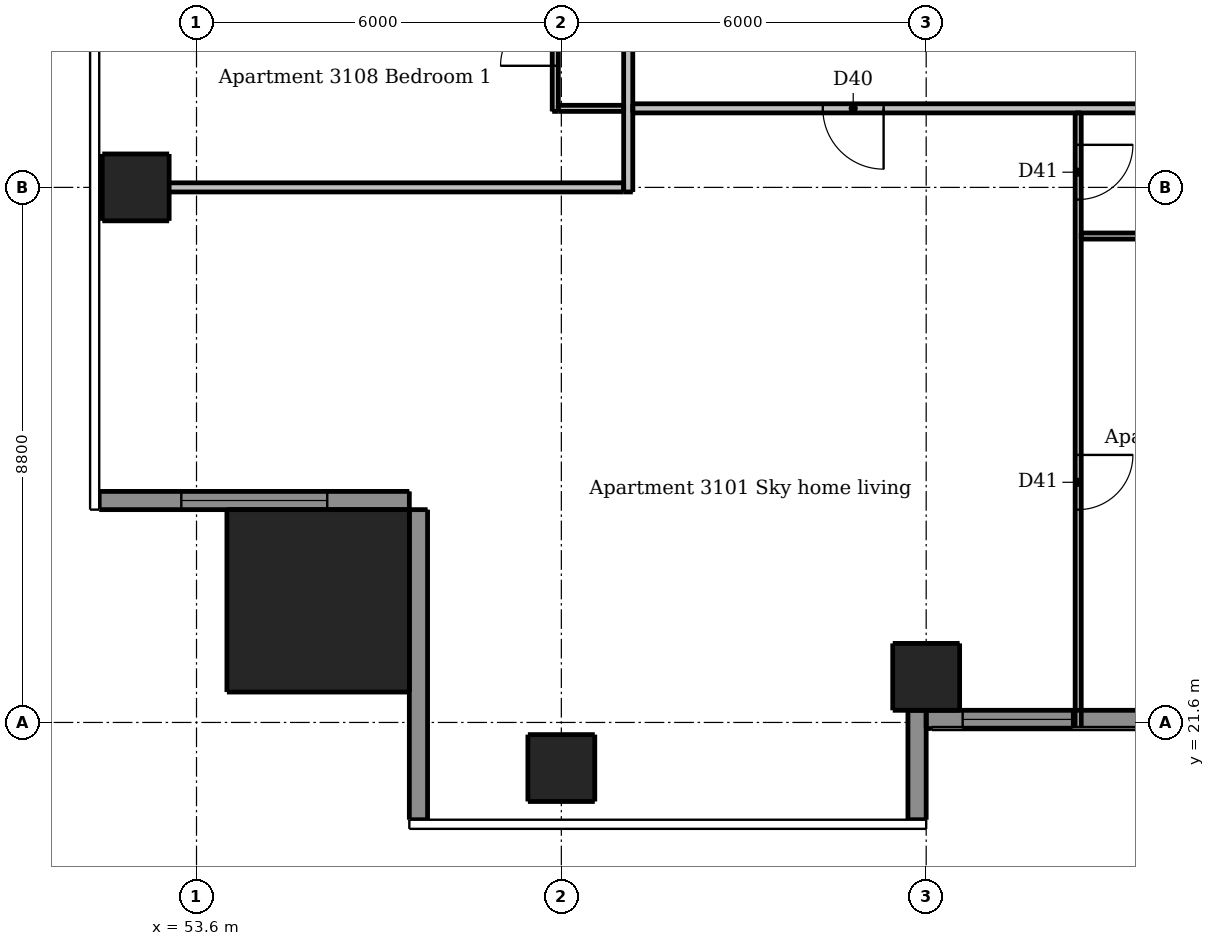
"""IFC4 building model, lengths in metres.
Left out: names, types, materials, properties, quantities, classifications, styles, units other than length and angle.
Written with IfcOpenShell. Run it as: python <this file> out.ifc"""

import sys

from ifc_helpers import new_model, si_unit, direction, frame, frame_2d, origin, origin_2d, place, context, subcontext, project, spatial, rectangle, extrude, element, fill, save


model = new_model("IFC4")
c1 = context("Model", 3, precision=1e-05, world=origin(), true_north=direction((0.0, 1.0)))
c2 = subcontext(c1, "Body", "Model", "MODEL_VIEW")
j1 = project(units=[si_unit("LENGTHUNIT", "METRE"), si_unit("PLANEANGLEUNIT", "RADIAN")], contexts=[c1])
p1 = place(None, origin())
s1 = spatial("IfcSite", under=j1, at=p1, CompositionType="ELEMENT")
p2 = place(p1, origin())
s2 = spatial("IfcBuilding", under=s1, at=p2, CompositionType="ELEMENT")
p3 = place(p2, frame((0.0, 0.0, 115.0)))
s3 = spatial("IfcBuildingStorey", under=s2, at=p3, CompositionType="ELEMENT", Elevation=115.0)
for number, where, z_axis, x_axis in (
    (1, (59.6, 20.85, 0.0), (0.0, 0.0, 1.0), (1.0, 0.0, 0.0)),
    (2, (65.6, 22.35, 0.0), (0.0, 0.0, 1.0), (1.0, 0.0, 0.0)),
    (3, (52.6, 30.4, 0.0), (0.0, 0.0, 1.0), (1.0, 0.0, 0.0)),
):
    element("IfcColumn", number, at=place(p3, frame(where, z_axis=z_axis, x_axis=x_axis)), inside=s3, PredefinedType="COLUMN", context=c2, shape_type="SweptSolid", body=[
        extrude(rectangle(XDim=1.1, YDim=1.1, at=origin_2d()), origin(), (0.0, 0.0, 1.0), 3.05),
    ])
p4 = place(p3, frame((55.6, 23.6, 0.0), z_axis=(0.0, 0.0, 1.0), x_axis=(1.0, 0.0, 0.0)))
e4 = element("IfcColumn", 4, at=p4, inside=s3, PredefinedType="COLUMN", context=c2, shape_type="SweptSolid", body=[
    extrude(rectangle(XDim=3.0, YDim=3.0, at=origin_2d()), origin(), (0.0, 0.0, 1.0), 3.3),
])
p5 = place(p3, frame((65.45, 20.0, 0.0), z_axis=(0.0, 0.0, 1.0), x_axis=(0.0, 1.0, 0.0)))
e5 = element("IfcWall", 5, at=p5, inside=s3, PredefinedType="SOLIDWALL", context=c2, shape_type="SweptSolid", body=[
    extrude(rectangle(XDim=1.8, YDim=0.3, at=frame_2d((0.9, 0.0))), origin(), (0.0, 0.0, 1.0), 3.05),
])
p6 = place(p3, frame((52.0, 25.25, 0.0), z_axis=(0.0, 0.0, 1.0), x_axis=(1.0, 0.0, 0.0)))
e6 = element("IfcWall", 6, at=p6, inside=s3, PredefinedType="SOLIDWALL", context=c2, shape_type="SweptSolid", body=[
    extrude(rectangle(XDim=5.1, YDim=0.3, at=frame_2d((2.55, 0.0))), origin(), (0.0, 0.0, 1.0), 3.05),
])
p7 = place(p6, frame((1.35, 0.0, 0.15)))
e7 = element("IfcOpeningElement", 7, at=p7, cuts=e6, PredefinedType="OPENING", context=c2, shape_type="SweptSolid", body=[
    extrude(rectangle(XDim=2.4, YDim=2.1, at=frame_2d((1.2, 1.05))), frame((0.0, 0.16, 0.0), z_axis=(0.0, -1.0, 0.0), x_axis=(1.0, 0.0, 0.0)), (0.0, 0.0, 1.0), 0.32),
])
p8 = place(p3, frame((57.25, 25.1, 0.0), z_axis=(0.0, 0.0, 1.0), x_axis=(0.0, -1.0, 0.0)))
e8 = element("IfcWall", 8, at=p8, inside=s3, PredefinedType="SOLIDWALL", context=c2, shape_type="SweptSolid", body=[
    extrude(rectangle(XDim=5.1, YDim=0.3, at=frame_2d((2.55, 0.0))), origin(), (0.0, 0.0, 1.0), 3.05),
])
p9 = place(p3, frame((65.6, 21.65, 0.0), z_axis=(0.0, 0.0, 1.0), x_axis=(1.0, 0.0, 0.0)))
e9 = element("IfcWall", 9, at=p9, inside=s3, PredefinedType="SOLIDWALL", context=c2, shape_type="SweptSolid", body=[
    extrude(rectangle(XDim=5.7, YDim=0.3, at=frame_2d((2.85, 0.0))), origin(), (0.0, 0.0, 1.0), 3.05),
])
p10 = place(p9, frame((0.6, 0.0, 0.15)))
e10 = element("IfcOpeningElement", 10, at=p10, cuts=e9, PredefinedType="OPENING", context=c2, shape_type="SweptSolid", body=[
    extrude(rectangle(XDim=1.8, YDim=2.1, at=frame_2d((0.9, 1.05))), frame((0.0, 0.16, 0.0), z_axis=(0.0, -1.0, 0.0), x_axis=(1.0, 0.0, 0.0)), (0.0, 0.0, 1.0), 0.32),
])
p11 = place(p9, frame((3.6, 0.0, 0.15)))
e11 = element("IfcOpeningElement", 11, at=p11, cuts=e9, PredefinedType="OPENING", context=c2, shape_type="SweptSolid", body=[
    extrude(rectangle(XDim=1.8, YDim=2.1, at=frame_2d((0.9, 1.05))), frame((0.0, 0.16, 0.0), z_axis=(0.0, -1.0, 0.0), x_axis=(1.0, 0.0, 0.0)), (0.0, 0.0, 1.0), 0.32),
])
p12 = place(p3, frame((59.5, 31.65, 0.0), z_axis=(0.0, 0.0, 1.0), x_axis=(0.0, 1.0, 0.0)))
e12 = element("IfcWall", 12, at=p12, inside=s3, PredefinedType="PARTITIONING", context=c2, shape_type="SweptSolid", body=[
    extrude(rectangle(XDim=16.675, YDim=0.1, at=frame_2d((8.337, 0.0))), origin(), (0.0, 0.0, 1.0), 2.51),
])
p13 = place(p12, frame((9.7, 0.0, 0.0)))
e13 = element("IfcOpeningElement", 13, at=p13, cuts=e12, PredefinedType="OPENING", context=c2, shape_type="SweptSolid", body=[
    extrude(rectangle(XDim=0.9, YDim=2.1, at=frame_2d((0.45, 1.05))), frame((0.0, 0.06, 0.0), z_axis=(0.0, -1.0, 0.0), x_axis=(1.0, 0.0, 0.0)), (0.0, 0.0, 1.0), 0.12),
])
p14 = place(p12, frame((14.8, 0.0, 0.0)))
e14 = element("IfcOpeningElement", 14, at=p14, cuts=e12, PredefinedType="OPENING", context=c2, shape_type="SweptSolid", body=[
    extrude(rectangle(XDim=0.9, YDim=2.1, at=frame_2d((0.45, 1.05))), frame((0.0, 0.06, 0.0), z_axis=(0.0, -1.0, 0.0), x_axis=(1.0, 0.0, 0.0)), (0.0, 0.0, 1.0), 0.12),
])
p15 = place(p12, frame((12.4, 0.0, 0.0)))
e15 = element("IfcOpeningElement", 15, at=p15, cuts=e12, PredefinedType="OPENING", context=c2, shape_type="SweptSolid", body=[
    extrude(rectangle(XDim=0.9, YDim=2.1, at=frame_2d((0.45, 1.05))), frame((0.0, 0.06, 0.0), z_axis=(0.0, -1.0, 0.0), x_axis=(1.0, 0.0, 0.0)), (0.0, 0.0, 1.0), 0.12),
])
p16 = place(p12, frame((5.2, 0.0, 0.0)))
e16 = element("IfcOpeningElement", 16, at=p16, cuts=e12, PredefinedType="OPENING", context=c2, shape_type="SweptSolid", body=[
    extrude(rectangle(XDim=0.9, YDim=2.1, at=frame_2d((0.45, 1.05))), frame((0.0, 0.06, 0.0), z_axis=(0.0, -1.0, 0.0), x_axis=(1.0, 0.0, 0.0)), (0.0, 0.0, 1.0), 0.12),
])
p17 = place(p12, frame((7.05, 0.0, 0.0)))
e17 = element("IfcOpeningElement", 17, at=p17, cuts=e12, PredefinedType="OPENING", context=c2, shape_type="SweptSolid", body=[
    extrude(rectangle(XDim=0.8, YDim=2.1, at=frame_2d((0.4, 1.05))), frame((0.0, 0.06, 0.0), z_axis=(0.0, -1.0, 0.0), x_axis=(1.0, 0.0, 0.0)), (0.0, 0.0, 1.0), 0.12),
])
p18 = place(p12, frame((0.75, 0.0, 0.0)))
e18 = element("IfcOpeningElement", 18, at=p18, cuts=e12, PredefinedType="OPENING", context=c2, shape_type="SweptSolid", body=[
    extrude(rectangle(XDim=0.9, YDim=2.1, at=frame_2d((0.45, 1.05))), frame((0.0, 0.06, 0.0), z_axis=(0.0, -1.0, 0.0), x_axis=(1.0, 0.0, 0.0)), (0.0, 0.0, 1.0), 0.12),
])
p19 = place(p12, frame((3.15, 0.0, 0.0)))
e19 = element("IfcOpeningElement", 19, at=p19, cuts=e12, PredefinedType="OPENING", context=c2, shape_type="SweptSolid", body=[
    extrude(rectangle(XDim=0.8, YDim=2.1, at=frame_2d((0.4, 1.05))), frame((0.0, 0.06, 0.0), z_axis=(0.0, -1.0, 0.0), x_axis=(1.0, 0.0, 0.0)), (0.0, 0.0, 1.0), 0.12),
])
p20 = place(p3, frame((68.1, 31.625, 0.0), z_axis=(0.0, 0.0, 1.0), x_axis=(0.0, -1.0, 0.0)))
e20 = element("IfcWall", 20, at=p20, inside=s3, PredefinedType="PARTITIONING", context=c2, shape_type="SweptSolid", body=[
    extrude(rectangle(XDim=10.125, YDim=0.1, at=frame_2d((5.062, 0.0))), origin(), (0.0, 0.0, 1.0), 3.05),
])
p21 = place(p20, frame((0.525, 0.0, 0.0)))
e21 = element("IfcOpeningElement", 21, at=p21, cuts=e20, PredefinedType="OPENING", context=c2, shape_type="SweptSolid", body=[
    extrude(rectangle(XDim=0.9, YDim=2.1, at=frame_2d((0.45, 1.05))), frame((0.0, 0.06, 0.0), z_axis=(0.0, -1.0, 0.0), x_axis=(1.0, 0.0, 0.0)), (0.0, 0.0, 1.0), 0.12),
])
p22 = place(p20, frame((5.625, 0.0, 0.0)))
e22 = element("IfcOpeningElement", 22, at=p22, cuts=e20, PredefinedType="OPENING", context=c2, shape_type="SweptSolid", body=[
    extrude(rectangle(XDim=0.9, YDim=2.1, at=frame_2d((0.45, 1.05))), frame((0.0, 0.06, 0.0), z_axis=(0.0, -1.0, 0.0), x_axis=(1.0, 0.0, 0.0)), (0.0, 0.0, 1.0), 0.12),
])
p23 = place(p3, frame((59.55, 31.7, 0.0), z_axis=(0.0, 0.0, 1.0), x_axis=(1.0, 0.0, 0.0)))
e23 = element("IfcWall", 23, at=p23, inside=s3, PredefinedType="PARTITIONING", context=c2, shape_type="SweptSolid", body=[
    extrude(rectangle(XDim=1.075, YDim=0.1, at=frame_2d((0.538, 0.0))), origin(), (0.0, 0.0, 1.0), 3.05),
])
p24 = place(p3, frame((68.15, 29.6, 0.0), z_axis=(0.0, 0.0, 1.0), x_axis=(1.0, 0.0, 0.0)))
e24 = element("IfcWall", 24, at=p24, inside=s3, PredefinedType="PARTITIONING", context=c2, shape_type="SweptSolid", body=[
    extrude(rectangle(XDim=6.475, YDim=0.1, at=frame_2d((3.238, 0.0))), origin(), (0.0, 0.0, 1.0), 3.05),
])
p25 = place(p24, frame((4.05, 0.0, 0.0)))
e25 = element("IfcOpeningElement", 25, at=p25, cuts=e24, PredefinedType="OPENING", context=c2, shape_type="SweptSolid", body=[
    extrude(rectangle(XDim=0.8, YDim=2.1, at=frame_2d((0.4, 1.05))), frame((0.0, 0.06, 0.0), z_axis=(0.0, -1.0, 0.0), x_axis=(1.0, 0.0, 0.0)), (0.0, 0.0, 1.0), 0.12),
])
p26 = place(p3, frame((60.7, 30.325, 0.0), z_axis=(0.0, 0.0, 1.0), x_axis=(0.0, 1.0, 0.0)))
e26 = element("IfcWall", 26, at=p26, inside=s3, PredefinedType="PARTITIONING", context=c2, shape_type="SweptSolid", body=[
    extrude(rectangle(XDim=28.9, YDim=0.15, at=frame_2d((14.45, 0.0))), origin(), (0.0, 0.0, 1.0), 3.05),
])
p27 = place(p26, frame((9.225, 0.0, 0.0)))
e27 = element("IfcOpeningElement", 27, at=p27, cuts=e26, PredefinedType="OPENING", context=c2, shape_type="SweptSolid", body=[
    extrude(rectangle(XDim=1.0, YDim=2.1, at=frame_2d((0.5, 1.05))), frame((0.0, 0.085, 0.0), z_axis=(0.0, -1.0, 0.0), x_axis=(1.0, 0.0, 0.0)), (0.0, 0.0, 1.0), 0.17),
])
p28 = place(p26, frame((26.025, 0.0, 0.0)))
e28 = element("IfcOpeningElement", 28, at=p28, cuts=e26, PredefinedType="OPENING", context=c2, shape_type="SweptSolid", body=[
    extrude(rectangle(XDim=1.0, YDim=2.1, at=frame_2d((0.5, 1.05))), frame((0.0, 0.085, 0.0), z_axis=(0.0, -1.0, 0.0), x_axis=(1.0, 0.0, 0.0)), (0.0, 0.0, 1.0), 0.17),
])
p29 = place(p3, frame((89.525, 31.7, 0.0), z_axis=(0.0, 0.0, 1.0), x_axis=(-1.0, 0.0, 0.0)))
e29 = element("IfcWall", 29, at=p29, inside=s3, PredefinedType="PARTITIONING", context=c2, shape_type="SweptSolid", body=[
    extrude(rectangle(XDim=28.75, YDim=0.15, at=frame_2d((14.375, 0.0))), origin(), (0.0, 0.0, 1.0), 3.05),
])
p30 = place(p29, frame((24.625, 0.0, 0.0)))
e30 = element("IfcOpeningElement", 30, at=p30, cuts=e29, PredefinedType="OPENING", context=c2, shape_type="SweptSolid", body=[
    extrude(rectangle(XDim=1.0, YDim=2.1, at=frame_2d((0.5, 1.05))), frame((0.0, 0.085, 0.0), z_axis=(0.0, -1.0, 0.0), x_axis=(1.0, 0.0, 0.0)), (0.0, 0.0, 1.0), 0.17),
])
p31 = place(p29, frame((5.425, 0.0, 0.0)))
e31 = element("IfcOpeningElement", 31, at=p31, cuts=e29, PredefinedType="OPENING", context=c2, shape_type="SweptSolid", body=[
    extrude(rectangle(XDim=1.0, YDim=2.1, at=frame_2d((0.5, 1.05))), frame((0.0, 0.085, 0.0), z_axis=(0.0, -1.0, 0.0), x_axis=(1.0, 0.0, 0.0)), (0.0, 0.0, 1.0), 0.17),
])
p32 = place(p3, frame((52.0, 30.4, 0.0), z_axis=(0.0, 0.0, 1.0), x_axis=(1.0, 0.0, 0.0)))
e32 = element("IfcWall", 32, at=p32, inside=s3, PredefinedType="PARTITIONING", context=c2, shape_type="SweptSolid", body=[
    extrude(rectangle(XDim=8.625, YDim=0.15, at=frame_2d((4.312, 0.0))), origin(), (0.0, 0.0, 1.0), 2.647),
])
p33 = place(p7, origin())
e33 = element("IfcWindow", 33, at=p33, inside=s3, PartitioningType="DOUBLE_PANEL_VERTICAL", PredefinedType="WINDOW", context=c2, shape_type="SweptSolid", body=[
    extrude(rectangle(XDim=2.4, YDim=2.1, at=frame_2d((1.2, 1.05))), frame((0.0, 0.03, 0.0), z_axis=(0.0, -1.0, 0.0), x_axis=(1.0, 0.0, 0.0)), (0.0, 0.0, 1.0), 0.06),
])
fill(e7, e33)
p34 = place(p10, origin())
e34 = element("IfcWindow", 34, at=p34, inside=s3, PartitioningType="DOUBLE_PANEL_VERTICAL", PredefinedType="WINDOW", context=c2, shape_type="SweptSolid", body=[
    extrude(rectangle(XDim=1.8, YDim=2.1, at=frame_2d((0.9, 1.05))), frame((0.0, 0.03, 0.0), z_axis=(0.0, -1.0, 0.0), x_axis=(1.0, 0.0, 0.0)), (0.0, 0.0, 1.0), 0.06),
])
fill(e10, e34)
p35 = place(p30, origin())
e35 = element("IfcDoor", 35, at=p35, inside=s3, OperationType="SINGLE_SWING_LEFT", PredefinedType="DOOR", context=c2, shape_type="SweptSolid", body=[
    extrude(rectangle(XDim=1.0, YDim=2.1, at=frame_2d((0.5, 1.05))), frame((0.0, 0.025, 0.0), z_axis=(0.0, -1.0, 0.0), x_axis=(1.0, 0.0, 0.0)), (0.0, 0.0, 1.0), 0.05),
])
fill(e30, e35)
p36 = place(p21, origin())
e36 = element("IfcDoor", 36, at=p36, inside=s3, OperationType="SINGLE_SWING_LEFT", PredefinedType="DOOR", context=c2, shape_type="SweptSolid", body=[
    extrude(rectangle(XDim=0.9, YDim=2.1, at=frame_2d((0.45, 1.05))), frame((0.0, 0.025, 0.0), z_axis=(0.0, -1.0, 0.0), x_axis=(1.0, 0.0, 0.0)), (0.0, 0.0, 1.0), 0.05),
])
fill(e21, e36)
p37 = place(p22, origin())
e37 = element("IfcDoor", 37, at=p37, inside=s3, OperationType="SINGLE_SWING_LEFT", PredefinedType="DOOR", context=c2, shape_type="SweptSolid", body=[
    extrude(rectangle(XDim=0.9, YDim=2.1, at=frame_2d((0.45, 1.05))), frame((0.0, 0.025, 0.0), z_axis=(0.0, -1.0, 0.0), x_axis=(1.0, 0.0, 0.0)), (0.0, 0.0, 1.0), 0.05),
])
fill(e22, e37)
p38 = place(p18, origin())
e38 = element("IfcDoor", 38, at=p38, inside=s3, OperationType="SINGLE_SWING_LEFT", PredefinedType="DOOR", context=c2, shape_type="SweptSolid", body=[
    extrude(rectangle(XDim=0.9, YDim=2.1, at=frame_2d((0.45, 1.05))), frame((0.0, 0.025, 0.0), z_axis=(0.0, -1.0, 0.0), x_axis=(1.0, 0.0, 0.0)), (0.0, 0.0, 1.0), 0.05),
])
fill(e18, e38)
save(model, sys.argv[1])
